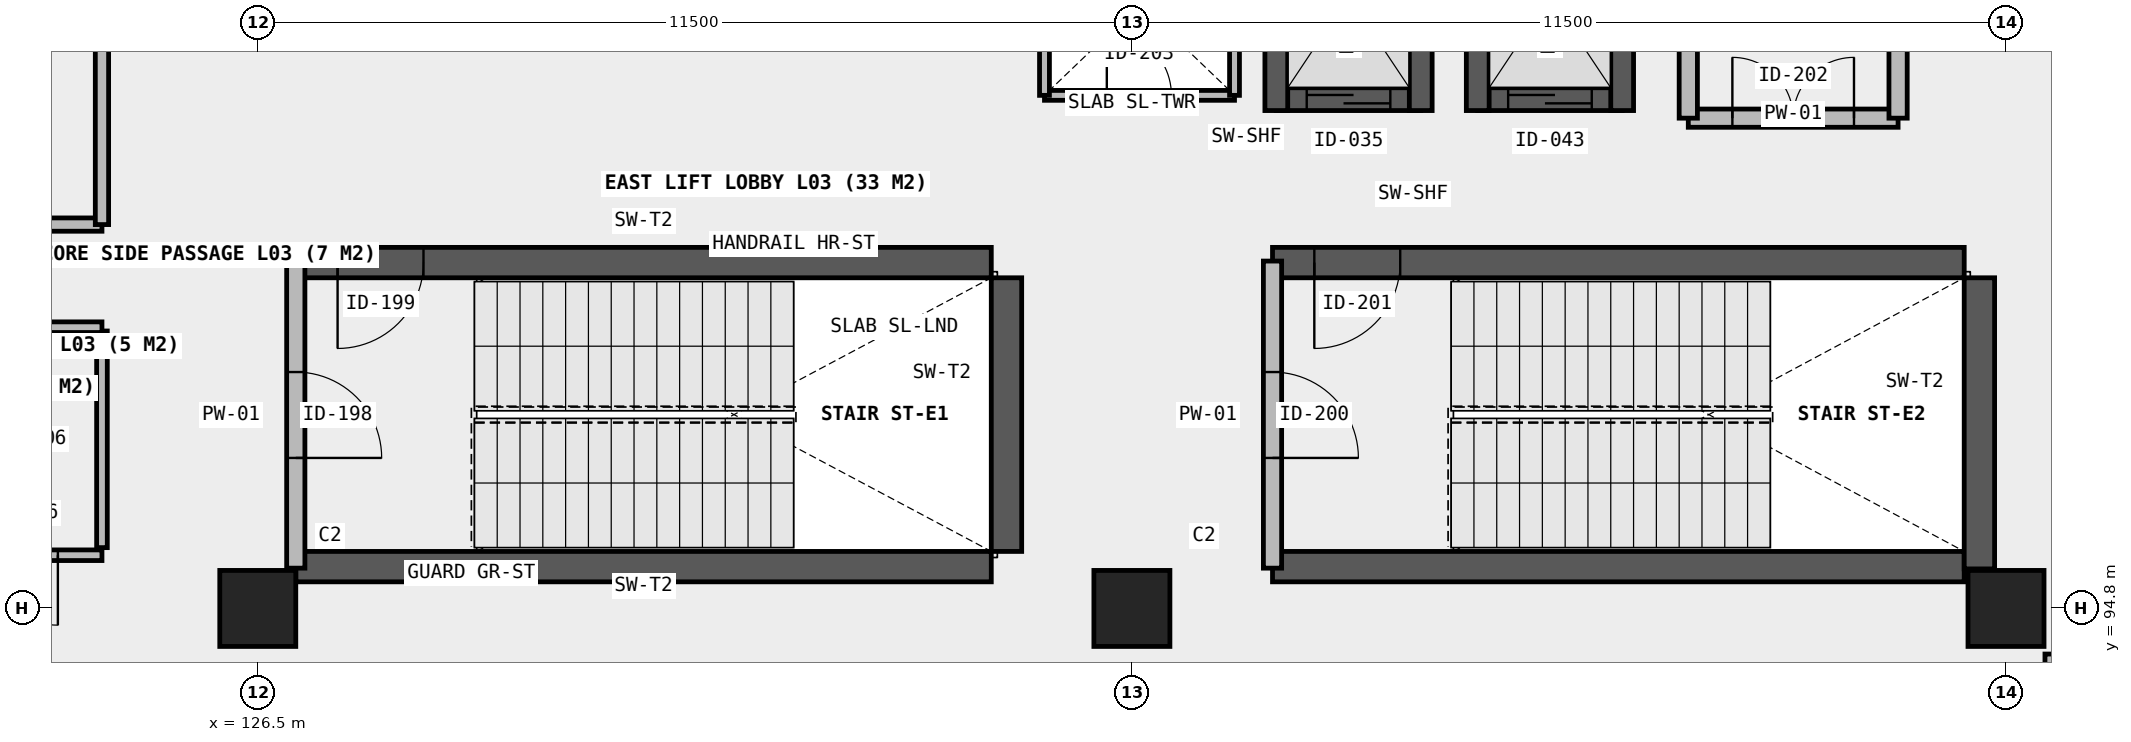
"""IFC4 building model, lengths in metres.
Left out: names, types, materials, properties, quantities, classifications, styles, units other than length and angle.
Written with IfcOpenShell. Run it as: python <this file> out.ifc"""

import sys

from ifc_helpers import new_model, si_unit, direction, frame, frame_2d, origin, origin_2d, place, context, subcontext, project, spatial, rectangle, extrude, element, fill, save


model = new_model("IFC4")
c1 = context("Model", 3, precision=1e-05, world=origin(), true_north=direction((0.0, 1.0)))
c2 = subcontext(c1, "Body", "Model", "MODEL_VIEW")
j1 = project(units=[si_unit("LENGTHUNIT", "METRE"), si_unit("PLANEANGLEUNIT", "RADIAN")], contexts=[c1])
p1 = place(None, origin())
s1 = spatial("IfcSite", under=j1, at=p1, CompositionType="ELEMENT")
p2 = place(p1, origin())
s2 = spatial("IfcBuilding", under=s1, at=p2, CompositionType="ELEMENT")
p3 = place(p2, frame((0.0, 0.0, 13.8)))
s3 = spatial("IfcBuildingStorey", under=s2, at=p3, CompositionType="ELEMENT", Elevation=13.8)
for number, where, z_axis, x_axis in (
    (1, (126.5, 94.8, 0.0), (0.0, 0.0, 1.0), (1.0, 0.0, 0.0)),
    (2, (138.0, 94.8, 0.0), (0.0, 0.0, 1.0), (1.0, 0.0, 0.0)),
    (3, (149.5, 94.8, 0.0), (0.0, 0.0, 1.0), (1.0, 0.0, 0.0)),
):
    element("IfcColumn", number, at=place(p3, frame(where, z_axis=z_axis, x_axis=x_axis)), inside=s3, PredefinedType="COLUMN", context=c2, shape_type="SweptSolid", body=[
        extrude(rectangle(XDim=1.0, YDim=1.0, at=origin_2d()), origin(), (0.0, 0.0, 1.0), 4.5),
    ])
p4 = place(p3, frame((139.9, 101.5, 0.0), z_axis=(0.0, 0.0, 1.0), x_axis=(1.0, 0.0, 0.0)))
e4 = element("IfcWall", 4, at=p4, inside=s3, PredefinedType="SHEAR", context=c2, shape_type="SweptSolid", body=[
    extrude(rectangle(XDim=1.9, YDim=0.3, at=frame_2d((0.95, 0.0))), origin(), (0.0, 0.0, 1.0), 4.5),
])
p5 = place(p4, frame((0.4, 0.0, 0.0)))
e5 = element("IfcOpeningElement", 5, at=p5, cuts=e4, PredefinedType="OPENING", context=c2, shape_type="SweptSolid", body=[
    extrude(rectangle(XDim=1.1, YDim=2.15, at=frame_2d((0.55, 1.075))), frame((0.0, 0.16, 0.0), z_axis=(0.0, -1.0, 0.0), x_axis=(1.0, 0.0, 0.0)), (0.0, 0.0, 1.0), 0.32),
])
for number, where, z_axis, x_axis in (
    (6, (139.9, 101.35, 0.0), (0.0, 0.0, 1.0), (0.0, 1.0, 0.0)),
    (7, (141.8, 101.35, 0.0), (0.0, 0.0, 1.0), (0.0, 1.0, 0.0)),
):
    element("IfcWall", number, at=place(p3, frame(where, z_axis=z_axis, x_axis=x_axis)), inside=s3, PredefinedType="SHEAR", context=c2, shape_type="SweptSolid", body=[
        extrude(rectangle(XDim=3.0, YDim=0.3, at=frame_2d((1.5, 0.0))), origin(), (0.0, 0.0, 1.0), 4.5),
    ])
p6 = place(p3, frame((142.55, 101.5, 0.0), z_axis=(0.0, 0.0, 1.0), x_axis=(1.0, 0.0, 0.0)))
e8 = element("IfcWall", 8, at=p6, inside=s3, PredefinedType="SHEAR", context=c2, shape_type="SweptSolid", body=[
    extrude(rectangle(XDim=1.9, YDim=0.3, at=frame_2d((0.95, 0.0))), origin(), (0.0, 0.0, 1.0), 4.5),
])
p7 = place(p6, frame((0.4, 0.0, 0.0)))
e9 = element("IfcOpeningElement", 9, at=p7, cuts=e8, PredefinedType="OPENING", context=c2, shape_type="SweptSolid", body=[
    extrude(rectangle(XDim=1.1, YDim=2.15, at=frame_2d((0.55, 1.075))), frame((0.0, 0.16, 0.0), z_axis=(0.0, -1.0, 0.0), x_axis=(1.0, 0.0, 0.0)), (0.0, 0.0, 1.0), 0.32),
])
for number, where, z_axis, x_axis in (
    (10, (142.55, 101.35, 0.0), (0.0, 0.0, 1.0), (0.0, 1.0, 0.0)),
    (11, (144.45, 101.35, 0.0), (0.0, 0.0, 1.0), (0.0, 1.0, 0.0)),
):
    element("IfcWall", number, at=place(p3, frame(where, z_axis=z_axis, x_axis=x_axis)), inside=s3, PredefinedType="SHEAR", context=c2, shape_type="SweptSolid", body=[
        extrude(rectangle(XDim=3.0, YDim=0.3, at=frame_2d((1.5, 0.0))), origin(), (0.0, 0.0, 1.0), 4.5),
    ])
p8 = place(p3, frame((127.0, 95.35, 0.0), z_axis=(0.0, 0.0, 1.0), x_axis=(1.0, 0.0, 0.0)))
e12 = element("IfcWall", 12, at=p8, inside=s3, PredefinedType="SHEAR", context=c2, shape_type="SweptSolid", body=[
    extrude(rectangle(XDim=9.15, YDim=0.4, at=frame_2d((4.575, 0.0))), origin(), (0.0, 0.0, 1.0), 4.5),
])
p9 = place(p3, frame((127.0, 99.35, 0.0), z_axis=(0.0, 0.0, 1.0), x_axis=(1.0, 0.0, 0.0)))
e13 = element("IfcWall", 13, at=p9, inside=s3, PredefinedType="SHEAR", context=c2, shape_type="SweptSolid", body=[
    extrude(rectangle(XDim=9.15, YDim=0.4, at=frame_2d((4.575, 0.0))), origin(), (0.0, 0.0, 1.0), 4.5),
])
p10 = place(p9, frame((0.55, 0.0, 0.0)))
e14 = element("IfcOpeningElement", 14, at=p10, cuts=e13, PredefinedType="OPENING", context=c2, shape_type="SweptSolid", body=[
    extrude(rectangle(XDim=1.13, YDim=2.15, at=frame_2d((0.565, 1.075))), frame((0.0, 0.21, 0.0), z_axis=(0.0, -1.0, 0.0), x_axis=(1.0, 0.0, 0.0)), (0.0, 0.0, 1.0), 0.42),
])
p11 = place(p3, frame((136.35, 95.55, 0.0), z_axis=(0.0, 0.0, 1.0), x_axis=(0.0, 1.0, 0.0)))
e15 = element("IfcWall", 15, at=p11, inside=s3, PredefinedType="SHEAR", context=c2, shape_type="SweptSolid", body=[
    extrude(rectangle(XDim=3.6, YDim=0.4, at=frame_2d((1.8, 0.0))), origin(), (0.0, 0.0, 1.0), 4.5),
])
p12 = place(p3, frame((139.85, 95.35, 0.0), z_axis=(0.0, 0.0, 1.0), x_axis=(1.0, 0.0, 0.0)))
e16 = element("IfcWall", 16, at=p12, inside=s3, PredefinedType="SHEAR", context=c2, shape_type="SweptSolid", body=[
    extrude(rectangle(XDim=9.1, YDim=0.4, at=frame_2d((4.55, 0.0))), origin(), (0.0, 0.0, 1.0), 4.5),
])
p13 = place(p3, frame((139.85, 99.35, 0.0), z_axis=(0.0, 0.0, 1.0), x_axis=(1.0, 0.0, 0.0)))
e17 = element("IfcWall", 17, at=p13, inside=s3, PredefinedType="SHEAR", context=c2, shape_type="SweptSolid", body=[
    extrude(rectangle(XDim=9.1, YDim=0.4, at=frame_2d((4.55, 0.0))), origin(), (0.0, 0.0, 1.0), 4.5),
])
p14 = place(p13, frame((0.55, 0.0, 0.0)))
e18 = element("IfcOpeningElement", 18, at=p14, cuts=e17, PredefinedType="OPENING", context=c2, shape_type="SweptSolid", body=[
    extrude(rectangle(XDim=1.13, YDim=2.15, at=frame_2d((0.565, 1.075))), frame((0.0, 0.21, 0.0), z_axis=(0.0, -1.0, 0.0), x_axis=(1.0, 0.0, 0.0)), (0.0, 0.0, 1.0), 0.42),
])
p15 = place(p3, frame((149.15, 95.32, 0.0), z_axis=(0.0, 0.0, 1.0), x_axis=(0.0, 1.0, 0.0)))
e19 = element("IfcWall", 19, at=p15, inside=s3, PredefinedType="SHEAR", context=c2, shape_type="SweptSolid", body=[
    extrude(rectangle(XDim=3.83, YDim=0.4, at=frame_2d((1.915, 0.0))), origin(), (0.0, 0.0, 1.0), 4.5),
])
p16 = place(p3, frame((127.0, 95.33, 0.0), z_axis=(0.0, 0.0, 1.0), x_axis=(0.0, 1.0, 0.0)))
e20 = element("IfcWall", 20, at=p16, inside=s3, PredefinedType="SOLIDWALL", context=c2, shape_type="SweptSolid", body=[
    extrude(rectangle(XDim=4.04, YDim=0.24, at=frame_2d((2.02, 0.0))), origin(), (0.0, 0.0, 1.0), 4.22),
])
p17 = place(p16, frame((1.45, 0.0, 0.0)))
e21 = element("IfcOpeningElement", 21, at=p17, cuts=e20, PredefinedType="OPENING", context=c2, shape_type="SweptSolid", body=[
    extrude(rectangle(XDim=1.13, YDim=2.15, at=frame_2d((0.565, 1.075))), frame((0.0, 0.13, 0.0), z_axis=(0.0, -1.0, 0.0), x_axis=(1.0, 0.0, 0.0)), (0.0, 0.0, 1.0), 0.26),
])
p18 = place(p3, frame((139.85, 95.33, 0.0), z_axis=(0.0, 0.0, 1.0), x_axis=(0.0, 1.0, 0.0)))
e22 = element("IfcWall", 22, at=p18, inside=s3, PredefinedType="SOLIDWALL", context=c2, shape_type="SweptSolid", body=[
    extrude(rectangle(XDim=4.04, YDim=0.24, at=frame_2d((2.02, 0.0))), origin(), (0.0, 0.0, 1.0), 4.22),
])
p19 = place(p18, frame((1.45, 0.0, 0.0)))
e23 = element("IfcOpeningElement", 23, at=p19, cuts=e22, PredefinedType="OPENING", context=c2, shape_type="SweptSolid", body=[
    extrude(rectangle(XDim=1.13, YDim=2.15, at=frame_2d((0.565, 1.075))), frame((0.0, 0.13, 0.0), z_axis=(0.0, -1.0, 0.0), x_axis=(1.0, 0.0, 0.0)), (0.0, 0.0, 1.0), 0.26),
])
p20 = place(p3, frame((145.32, 101.25, 0.0), z_axis=(0.0, 0.0, 1.0), x_axis=(1.0, 0.0, 0.0)))
e24 = element("IfcWall", 24, at=p20, inside=s3, PredefinedType="SOLIDWALL", context=c2, shape_type="SweptSolid", body=[
    extrude(rectangle(XDim=2.76, YDim=0.24, at=frame_2d((1.38, 0.0))), origin(), (0.0, 0.0, 1.0), 4.22),
])
p21 = place(p20, frame((0.58, 0.0, 0.0)))
e25 = element("IfcOpeningElement", 25, at=p21, cuts=e24, PredefinedType="OPENING", context=c2, shape_type="SweptSolid", body=[
    extrude(rectangle(XDim=1.6, YDim=2.15, at=frame_2d((0.8, 1.075))), frame((0.0, 0.13, 0.0), z_axis=(0.0, -1.0, 0.0), x_axis=(1.0, 0.0, 0.0)), (0.0, 0.0, 1.0), 0.26),
])
for number, where, z_axis, x_axis in (
    (26, (145.32, 101.25, 0.0), (0.0, 0.0, 1.0), (0.0, 1.0, 0.0)),
    (27, (148.08, 101.25, 0.0), (0.0, 0.0, 1.0), (0.0, 1.0, 0.0)),
):
    element("IfcWall", number, at=place(p3, frame(where, z_axis=z_axis, x_axis=x_axis)), inside=s3, PredefinedType="SOLIDWALL", context=c2, shape_type="SweptSolid", body=[
        extrude(rectangle(XDim=2.6, YDim=0.24, at=frame_2d((1.3, 0.0))), origin(), (0.0, 0.0, 1.0), 4.22),
    ])
p22 = place(p3, frame((136.85, 101.55, 0.0), z_axis=(0.0, 0.0, 1.0), x_axis=(1.0, 0.0, 0.0)))
e28 = element("IfcWall", 28, at=p22, inside=s3, PredefinedType="PLUMBINGWALL", context=c2, shape_type="SweptSolid", body=[
    extrude(rectangle(XDim=2.5, YDim=0.13, at=frame_2d((1.25, 0.0))), origin(), (0.0, 0.0, 1.0), 4.22),
])
p23 = place(p22, frame((0.82, 0.0, 0.0)))
e29 = element("IfcOpeningElement", 29, at=p23, cuts=e28, PredefinedType="OPENING", context=c2, shape_type="SweptSolid", body=[
    extrude(rectangle(XDim=0.85, YDim=2.0, at=frame_2d((0.425, 1.0))), frame((0.0, 0.075, 0.0), z_axis=(0.0, -1.0, 0.0), x_axis=(1.0, 0.0, 0.0)), (0.0, 0.0, 1.0), 0.15),
])
for number, where, z_axis, x_axis in (
    (30, (136.85, 101.55, 0.0), (0.0, 0.0, 1.0), (0.0, 1.0, 0.0)),
    (31, (139.35, 101.55, 0.0), (0.0, 0.0, 1.0), (0.0, 1.0, 0.0)),
):
    element("IfcWall", number, at=place(p3, frame(where, z_axis=z_axis, x_axis=x_axis)), inside=s3, PredefinedType="PLUMBINGWALL", context=c2, shape_type="SweptSolid", body=[
        extrude(rectangle(XDim=2.4, YDim=0.13, at=frame_2d((1.2, 0.0))), origin(), (0.0, 0.0, 1.0), 4.22),
    ])
p24 = place(p3, frame((118.15, 95.5, 0.0), z_axis=(0.0, 0.0, 1.0), x_axis=(1.0, 0.0, 0.0)))
e32 = element("IfcWall", 32, at=p24, inside=s3, PredefinedType="PLUMBINGWALL", context=c2, shape_type="SweptSolid", body=[
    extrude(rectangle(XDim=6.3, YDim=0.14, at=frame_2d((3.15, 0.0))), origin(), (0.0, 0.0, 1.0), 4.22),
])
p25 = place(p24, frame((0.72, 0.0, 0.0)))
e33 = element("IfcOpeningElement", 33, at=p25, cuts=e32, PredefinedType="OPENING", context=c2, shape_type="SweptSolid", body=[
    extrude(rectangle(XDim=0.95, YDim=2.1, at=frame_2d((0.475, 1.05))), frame((0.0, 0.08, 0.0), z_axis=(0.0, -1.0, 0.0), x_axis=(1.0, 0.0, 0.0)), (0.0, 0.0, 1.0), 0.16),
])
p26 = place(p24, frame((2.8, 0.0, 0.0)))
e34 = element("IfcOpeningElement", 34, at=p26, cuts=e32, PredefinedType="OPENING", context=c2, shape_type="SweptSolid", body=[
    extrude(rectangle(XDim=0.92, YDim=2.1, at=frame_2d((0.46, 1.05))), frame((0.0, 0.08, 0.0), z_axis=(0.0, -1.0, 0.0), x_axis=(1.0, 0.0, 0.0)), (0.0, 0.0, 1.0), 0.16),
])
p27 = place(p24, frame((4.8, 0.0, 0.0)))
e35 = element("IfcOpeningElement", 35, at=p27, cuts=e32, PredefinedType="OPENING", context=c2, shape_type="SweptSolid", body=[
    extrude(rectangle(XDim=0.92, YDim=2.1, at=frame_2d((0.46, 1.05))), frame((0.0, 0.08, 0.0), z_axis=(0.0, -1.0, 0.0), x_axis=(1.0, 0.0, 0.0)), (0.0, 0.0, 1.0), 0.16),
])
p28 = place(p3, frame((124.45, 95.6, 0.0), z_axis=(0.0, 0.0, 1.0), x_axis=(0.0, 1.0, 0.0)))
e36 = element("IfcWall", 36, at=p28, inside=s3, PredefinedType="PLUMBINGWALL", context=c2, shape_type="SweptSolid", body=[
    extrude(rectangle(XDim=2.85, YDim=0.14, at=frame_2d((1.425, 0.0))), origin(), (0.0, 0.0, 1.0), 4.22),
])
p29 = place(p3, frame((118.15, 98.5, 0.0), z_axis=(0.0, 0.0, 1.0), x_axis=(1.0, 0.0, 0.0)))
e37 = element("IfcWall", 37, at=p29, inside=s3, PredefinedType="PLUMBINGWALL", context=c2, shape_type="SweptSolid", body=[
    extrude(rectangle(XDim=6.3, YDim=0.14, at=frame_2d((3.15, 0.0))), origin(), (0.0, 0.0, 1.0), 4.22),
])
p30 = place(p3, frame((115.16, 99.85, 0.0), z_axis=(0.0, 0.0, 1.0), x_axis=(1.0, 0.0, 0.0)))
e38 = element("IfcWall", 38, at=p30, inside=s3, PredefinedType="PARTITIONING", context=c2, shape_type="SweptSolid", body=[
    extrude(rectangle(XDim=9.29, YDim=0.175, at=frame_2d((4.645, 0.0))), origin(), (0.0, 0.0, 1.0), 4.22),
])
p31 = place(p30, frame((3.64, 0.0, 0.0)))
e39 = element("IfcOpeningElement", 39, at=p31, cuts=e38, PredefinedType="OPENING", context=c2, shape_type="SweptSolid", body=[
    extrude(rectangle(XDim=1.02, YDim=2.15, at=frame_2d((0.51, 1.075))), frame((0.0, 0.098, 0.0), z_axis=(0.0, -1.0, 0.0), x_axis=(1.0, 0.0, 0.0)), (0.0, 0.0, 1.0), 0.195),
])
p32 = place(p3, frame((124.45, 99.85, 0.0), z_axis=(0.0, 0.0, 1.0), x_axis=(0.0, 1.0, 0.0)))
e40 = element("IfcWall", 40, at=p32, inside=s3, PredefinedType="PARTITIONING", context=c2, shape_type="SweptSolid", body=[
    extrude(rectangle(XDim=14.55, YDim=0.175, at=frame_2d((7.275, 0.0))), origin(), (0.0, 0.0, 1.0), 4.22),
])
p33 = place(p3, frame((150.1, 86.4, 0.0), z_axis=(0.0, 0.0, 1.0), x_axis=(0.0, 1.0, 0.0)))
e41 = element("IfcWall", 41, at=p33, inside=s3, PredefinedType="PARTITIONING", context=c2, shape_type="SweptSolid", body=[
    extrude(rectangle(XDim=7.8, YDim=0.175, at=frame_2d((3.9, 0.0))), origin(), (0.0, 0.0, 1.0), 4.22),
])
p34 = place(p33, frame((2.8, 0.0, 0.0)))
e42 = element("IfcOpeningElement", 42, at=p34, cuts=e41, PredefinedType="OPENING", context=c2, shape_type="SweptSolid", body=[
    extrude(rectangle(XDim=1.02, YDim=2.15, at=frame_2d((0.51, 1.075))), frame((0.0, 0.098, 0.0), z_axis=(0.0, -1.0, 0.0), x_axis=(1.0, 0.0, 0.0)), (0.0, 0.0, 1.0), 0.195),
])
p35 = place(p5, origin())
e43 = element("IfcDoor", 43, at=p35, inside=s3, OperationType="SLIDING_TO_LEFT", PredefinedType="DOOR", context=c2, shape_type="SweptSolid", body=[
    extrude(rectangle(XDim=1.1, YDim=2.15, at=frame_2d((0.55, 1.075))), frame((0.0, 0.025, 0.0), z_axis=(0.0, -1.0, 0.0), x_axis=(1.0, 0.0, 0.0)), (0.0, 0.0, 1.0), 0.05),
])
fill(e5, e43)
p36 = place(p7, origin())
e44 = element("IfcDoor", 44, at=p36, inside=s3, OperationType="SLIDING_TO_LEFT", PredefinedType="DOOR", context=c2, shape_type="SweptSolid", body=[
    extrude(rectangle(XDim=1.1, YDim=2.15, at=frame_2d((0.55, 1.075))), frame((0.0, 0.025, 0.0), z_axis=(0.0, -1.0, 0.0), x_axis=(1.0, 0.0, 0.0)), (0.0, 0.0, 1.0), 0.05),
])
fill(e9, e44)
p37 = place(p17, frame((0.565, 0.0, 0.0), z_axis=(0.0, 0.0, 1.0), x_axis=(-1.0, 0.0, 0.0)))
e45 = element("IfcDoor", 45, at=p37, inside=s3, OperationType="SINGLE_SWING_LEFT", PredefinedType="DOOR", context=c2, shape_type="SweptSolid", body=[
    extrude(rectangle(XDim=1.13, YDim=2.15, at=frame_2d((0.0, 1.075))), frame((0.0, 0.025, 0.0), z_axis=(0.0, -1.0, 0.0), x_axis=(1.0, 0.0, 0.0)), (0.0, 0.0, 1.0), 0.05),
])
fill(e21, e45)
p38 = place(p10, frame((0.565, 0.0, 0.0), z_axis=(0.0, 0.0, 1.0), x_axis=(-1.0, 0.0, 0.0)))
e46 = element("IfcDoor", 46, at=p38, inside=s3, OperationType="SINGLE_SWING_LEFT", PredefinedType="DOOR", context=c2, shape_type="SweptSolid", body=[
    extrude(rectangle(XDim=1.13, YDim=2.15, at=frame_2d((0.0, 1.075))), frame((0.0, 0.025, 0.0), z_axis=(0.0, -1.0, 0.0), x_axis=(1.0, 0.0, 0.0)), (0.0, 0.0, 1.0), 0.05),
])
fill(e14, e46)
p39 = place(p19, frame((0.565, 0.0, 0.0), z_axis=(0.0, 0.0, 1.0), x_axis=(-1.0, 0.0, 0.0)))
e47 = element("IfcDoor", 47, at=p39, inside=s3, OperationType="SINGLE_SWING_LEFT", PredefinedType="DOOR", context=c2, shape_type="SweptSolid", body=[
    extrude(rectangle(XDim=1.13, YDim=2.15, at=frame_2d((0.0, 1.075))), frame((0.0, 0.025, 0.0), z_axis=(0.0, -1.0, 0.0), x_axis=(1.0, 0.0, 0.0)), (0.0, 0.0, 1.0), 0.05),
])
fill(e23, e47)
p40 = place(p14, frame((0.565, 0.0, 0.0), z_axis=(0.0, 0.0, 1.0), x_axis=(-1.0, 0.0, 0.0)))
e48 = element("IfcDoor", 48, at=p40, inside=s3, OperationType="SINGLE_SWING_LEFT", PredefinedType="DOOR", context=c2, shape_type="SweptSolid", body=[
    extrude(rectangle(XDim=1.13, YDim=2.15, at=frame_2d((0.0, 1.075))), frame((0.0, 0.025, 0.0), z_axis=(0.0, -1.0, 0.0), x_axis=(1.0, 0.0, 0.0)), (0.0, 0.0, 1.0), 0.05),
])
fill(e18, e48)
p41 = place(p21, origin())
e49 = element("IfcDoor", 49, at=p41, inside=s3, OperationType="DOUBLE_DOOR_SINGLE_SWING", PredefinedType="DOOR", context=c2, shape_type="SweptSolid", body=[
    extrude(rectangle(XDim=1.6, YDim=2.15, at=frame_2d((0.8, 1.075))), frame((0.0, 0.025, 0.0), z_axis=(0.0, -1.0, 0.0), x_axis=(1.0, 0.0, 0.0)), (0.0, 0.0, 1.0), 0.05),
])
fill(e25, e49)
p42 = place(p23, origin())
e50 = element("IfcDoor", 50, at=p42, inside=s3, OperationType="SINGLE_SWING_LEFT", PredefinedType="TRAPDOOR", context=c2, shape_type="SweptSolid", body=[
    extrude(rectangle(XDim=0.85, YDim=2.0, at=frame_2d((0.425, 1.0))), frame((0.0, 0.025, 0.0), z_axis=(0.0, -1.0, 0.0), x_axis=(1.0, 0.0, 0.0)), (0.0, 0.0, 1.0), 0.05),
])
fill(e29, e50)
p43 = place(p27, origin())
e51 = element("IfcDoor", 51, at=p43, inside=s3, OperationType="SINGLE_SWING_RIGHT", PredefinedType="DOOR", context=c2, shape_type="SweptSolid", body=[
    extrude(rectangle(XDim=0.92, YDim=2.1, at=frame_2d((0.46, 1.05))), frame((0.0, 0.025, 0.0), z_axis=(0.0, -1.0, 0.0), x_axis=(1.0, 0.0, 0.0)), (0.0, 0.0, 1.0), 0.05),
])
fill(e35, e51)
save(model, sys.argv[1])
